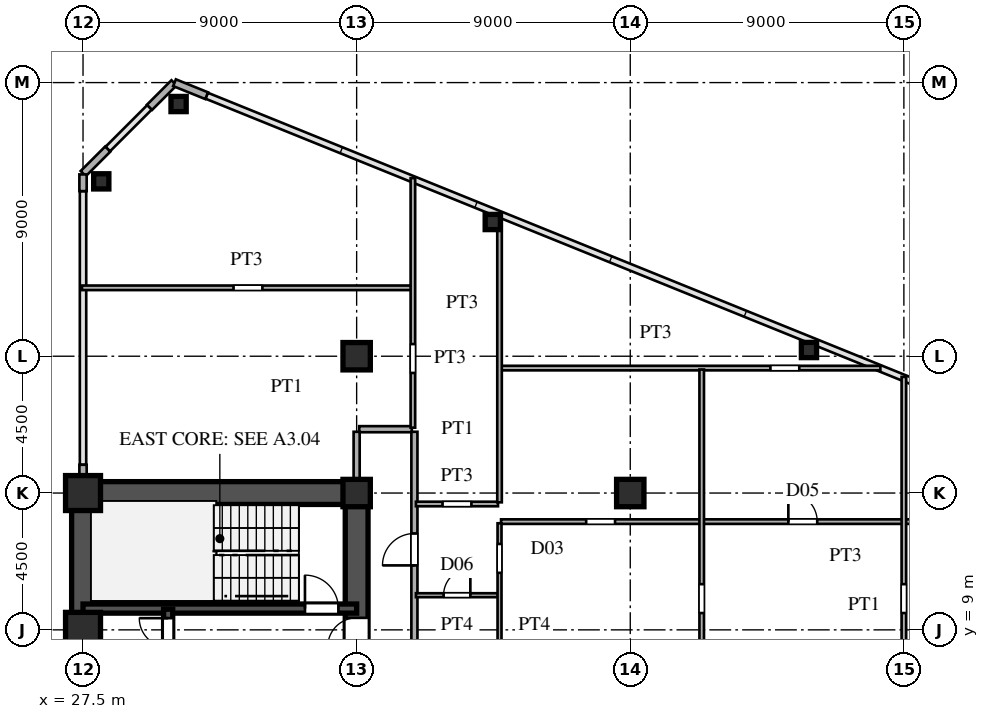
"""IFC4 building model, lengths in metres.
Left out: names, types, materials, properties, quantities, classifications, styles, units other than length and angle.
Written with IfcOpenShell. Run it as: python <this file> out.ifc"""

import sys

from ifc_helpers import new_model, si_unit, direction, frame, frame_2d, origin, origin_2d, place, context, subcontext, project, spatial, rectangle, hollow_rectangle, i_section, extrude, source, transform, mapped, element, fill, save


model = new_model("IFC4")
c1 = context("Model", 3, precision=1e-05, world=origin(), true_north=direction((0.0, 1.0)))
c2 = subcontext(c1, "Body", "Model", "MODEL_VIEW")
j1 = project(units=[si_unit("LENGTHUNIT", "METRE"), si_unit("PLANEANGLEUNIT", "RADIAN")], contexts=[c1])
p1 = place(None, origin())
s1 = spatial("IfcSite", under=j1, at=p1, CompositionType="ELEMENT")
p2 = place(p1, origin())
s2 = spatial("IfcBuilding", under=s1, at=p2, CompositionType="ELEMENT")
p3 = place(p2, frame((0.0, 0.0, 33.3)))
s3 = spatial("IfcBuildingStorey", under=s2, at=p3, CompositionType="ELEMENT", Elevation=33.3)
m1 = source(origin(), c2, "Body", "SweptSolid", [
    extrude(hollow_rectangle(XDim=1.15, YDim=1.15, WallThickness=0.048, at=origin_2d()), origin(), (0.0, 0.0, 1.0), 3.6),
])
for number, where, z_axis, x_axis in (
    (1, (27.5, 9.0, 0.0), (0.0, 0.0, 1.0), (1.0, 0.0, 0.0)),
    (2, (27.5, 13.5, 0.0), (0.0, 0.0, 1.0), (1.0, 0.0, 0.0)),
):
    element("IfcColumn", number, at=place(p3, frame(where, z_axis=z_axis, x_axis=x_axis)), inside=s3, PredefinedType="COLUMN", context=c2, shape_type="MappedRepresentation", body=[
        mapped(m1, transform((0.0, 0.0, 0.0), scale=1.0)),
    ])
m2 = source(origin(), c2, "Body", "SweptSolid", [
    extrude(i_section(OverallWidth=0.9, OverallDepth=0.9, WebThickness=0.036, FlangeThickness=0.055, at=origin_2d()), origin(), (0.0, 0.0, 1.0), 3.6),
])
for number, where, z_axis, x_axis in (
    (3, (36.5, 13.5, 0.0), (0.0, 0.0, 1.0), (1.0, 0.0, 0.0)),
    (4, (36.5, 18.0, 0.0), (0.0, 0.0, 1.0), (1.0, 0.0, 0.0)),
    (5, (45.5, 13.5, 0.0), (0.0, 0.0, 1.0), (1.0, 0.0, 0.0)),
):
    element("IfcColumn", number, at=place(p3, frame(where, z_axis=z_axis, x_axis=x_axis)), inside=s3, PredefinedType="COLUMN", context=c2, shape_type="MappedRepresentation", body=[
        mapped(m2, transform((0.0, 0.0, 0.0), scale=1.0)),
    ])
m3 = source(origin(), c2, "Body", "SweptSolid", [
    extrude(hollow_rectangle(XDim=0.5, YDim=0.5, WallThickness=0.02, at=origin_2d()), origin(), (0.0, 0.0, 1.0), 3.6),
])
for number, where, z_axis, x_axis in (
    (6, (30.643, 26.295, 0.0), (0.0, 0.0, 1.0), (1.0, 0.0, 0.0)),
    (7, (28.1, 23.751, 0.0), (0.0, 0.0, 1.0), (1.0, 0.0, 0.0)),
    (8, (40.977, 22.414, 0.0), (0.0, 0.0, 1.0), (1.0, 0.0, 0.0)),
    (9, (51.378, 18.204, 0.0), (0.0, 0.0, 1.0), (1.0, 0.0, 0.0)),
):
    element("IfcColumn", number, at=place(p3, frame(where, z_axis=z_axis, x_axis=x_axis)), inside=s3, PredefinedType="COLUMN", context=c2, shape_type="MappedRepresentation", body=[
        mapped(m3, transform((0.0, 0.0, 0.0), scale=1.0)),
    ])
p4 = place(p3, frame((31.566, 26.569, 0.0), z_axis=(0.0, 0.0, 1.0), x_axis=(-0.927007103665, 0.375043770452, 0.0)))
e10 = element("IfcWall", 10, at=p4, inside=s3, PredefinedType="SOLIDWALL", context=c2, shape_type="SweptSolid", body=[
    extrude(rectangle(XDim=1.14, YDim=0.24, at=frame_2d((0.57, 0.0))), origin(), (0.0, 0.0, 1.0), 3.38),
])
for number, where, z_axis, x_axis in (
    (11, (30.493, 26.993, 0.0), (0.0, 0.0, 1.0), (-0.707, -0.707, 0.0)),
    (12, (28.313, 24.813, 0.0), (0.0, 0.0, 1.0), (-0.707, -0.707, 0.0)),
):
    element("IfcWall", number, at=place(p3, frame(where, z_axis=z_axis, x_axis=x_axis)), inside=s3, PredefinedType="SOLIDWALL", context=c2, shape_type="SweptSolid", body=[
        extrude(rectangle(XDim=1.14, YDim=0.24, at=frame_2d((0.57, 0.0))), origin(), (0.0, 0.0, 1.0), 3.38),
    ])
p5 = place(p3, frame((27.5, 13.88, 0.0), z_axis=(0.0, 0.0, 1.0), x_axis=(0.0, 1.0, 0.0)))
e13 = element("IfcWall", 13, at=p5, inside=s3, PredefinedType="SOLIDWALL", context=c2, shape_type="SweptSolid", body=[
    extrude(rectangle(XDim=0.55, YDim=0.24, at=frame_2d((0.275, 0.0))), origin(), (0.0, 0.0, 1.0), 2.88),
])
p6 = place(p3, frame((27.5, 23.43, 0.0), z_axis=(0.0, 0.0, 1.0), x_axis=(0.0, 1.0, 0.0)))
e14 = element("IfcWall", 14, at=p6, inside=s3, PredefinedType="SOLIDWALL", context=c2, shape_type="SweptSolid", body=[
    extrude(rectangle(XDim=0.55, YDim=0.24, at=frame_2d((0.275, 0.0))), origin(), (0.0, 0.0, 1.0), 3.38),
])
p7 = place(p3, frame((27.5, 1.3, 0.0), z_axis=(0.0, 0.0, 1.0), x_axis=(0.0, 1.0, 0.0)))
e15 = element("IfcWall", 15, at=p7, inside=s3, PredefinedType="SHEAR", context=c2, shape_type="SweptSolid", body=[
    extrude(rectangle(XDim=12.2, YDim=0.75, at=frame_2d((6.1, 0.0))), origin(), (0.0, 0.0, 1.0), 3.38),
])
p8 = place(p3, frame((27.5, 13.5, 0.0), z_axis=(0.0, 0.0, 1.0), x_axis=(1.0, 0.0, 0.0)))
e16 = element("IfcWall", 16, at=p8, inside=s3, PredefinedType="SHEAR", context=c2, shape_type="SweptSolid", body=[
    extrude(rectangle(XDim=9.0, YDim=0.75, at=frame_2d((4.5, 0.0))), origin(), (0.0, 0.0, 1.0), 3.38),
])
p9 = place(p3, frame((36.5, 8.2, 0.0), z_axis=(0.0, 0.0, 1.0), x_axis=(0.0, 1.0, 0.0)))
e17 = element("IfcWall", 17, at=p9, inside=s3, PredefinedType="SHEAR", context=c2, shape_type="SweptSolid", body=[
    extrude(rectangle(XDim=5.45, YDim=0.75, at=frame_2d((2.725, 0.0))), origin(), (0.0, 0.0, 1.0), 3.38),
])
p10 = place(p9, frame((0.245, 0.0, 0.0)))
e18 = element("IfcOpeningElement", 18, at=p10, cuts=e17, PredefinedType="OPENING", context=c2, shape_type="SweptSolid", body=[
    extrude(rectangle(XDim=0.95, YDim=2.15, at=frame_2d((0.475, 1.075))), frame((0.0, 0.385, 0.0), z_axis=(0.0, -1.0, 0.0), x_axis=(1.0, 0.0, 0.0)), (0.0, 0.0, 1.0), 0.77),
])
p11 = place(p3, frame((27.5, 9.7, 0.0), z_axis=(0.0, 0.0, 1.0), x_axis=(1.0, 0.0, 0.0)))
e19 = element("IfcWall", 19, at=p11, inside=s3, PredefinedType="SHEAR", context=c2, shape_type="SweptSolid", body=[
    extrude(rectangle(XDim=9.0, YDim=0.3, at=frame_2d((4.5, 0.0))), origin(), (0.0, 0.0, 1.0), 3.38),
])
p12 = place(p11, frame((7.3, 0.0, 0.0)))
e20 = element("IfcOpeningElement", 20, at=p12, cuts=e19, PredefinedType="OPENING", context=c2, shape_type="SweptSolid", body=[
    extrude(rectangle(XDim=1.1, YDim=2.2, at=frame_2d((0.55, 1.1))), frame((0.0, 0.16, 0.0), z_axis=(0.0, -1.0, 0.0), x_axis=(1.0, 0.0, 0.0)), (0.0, 0.0, 1.0), 0.32),
])
p13 = place(p3, frame((30.3, 8.15, 0.0), z_axis=(0.0, 0.0, 1.0), x_axis=(0.0, 1.0, 0.0)))
e21 = element("IfcWall", 21, at=p13, inside=s3, PredefinedType="SHEAR", context=c2, shape_type="SweptSolid", body=[
    extrude(rectangle(XDim=1.53, YDim=0.3, at=frame_2d((0.765, 0.0))), origin(), (0.0, 0.0, 1.0), 3.38),
])
p14 = place(p13, frame((0.285, 0.0, 0.0)))
e22 = element("IfcOpeningElement", 22, at=p14, cuts=e21, PredefinedType="OPENING", context=c2, shape_type="SweptSolid", body=[
    extrude(rectangle(XDim=0.95, YDim=2.15, at=frame_2d((0.475, 1.075))), frame((0.0, 0.16, 0.0), z_axis=(0.0, -1.0, 0.0), x_axis=(1.0, 0.0, 0.0)), (0.0, 0.0, 1.0), 0.32),
])
p15 = place(p3, frame((38.45, 10.14, 0.0), z_axis=(0.0, 0.0, 1.0), x_axis=(1.0, 0.0, 0.0)))
e23 = element("IfcWall", 23, at=p15, inside=s3, PredefinedType="PARTITIONING", context=c2, shape_type="SweptSolid", body=[
    extrude(rectangle(XDim=2.7, YDim=0.13, at=frame_2d((1.35, 0.0))), origin(), (0.0, 0.0, 1.0), 3.38),
])
p16 = place(p15, frame((0.91, 0.0, 0.0)))
e24 = element("IfcOpeningElement", 24, at=p16, cuts=e23, PredefinedType="OPENING", context=c2, shape_type="SweptSolid", body=[
    extrude(rectangle(XDim=0.88, YDim=2.1, at=frame_2d((0.44, 1.05))), frame((0.0, 0.075, 0.0), z_axis=(0.0, -1.0, 0.0), x_axis=(1.0, 0.0, 0.0)), (0.0, 0.0, 1.0), 0.15),
])
p17 = place(p3, frame((41.25, 12.56, 0.0), z_axis=(0.0, 0.0, 1.0), x_axis=(1.0, 0.0, 0.0)))
e25 = element("IfcWall", 25, at=p17, inside=s3, PredefinedType="PARTITIONING", context=c2, shape_type="SweptSolid", body=[
    extrude(rectangle(XDim=24.969, YDim=0.15, at=frame_2d((12.484, 0.0))), origin(), (0.0, 0.0, 1.0), 3.38),
])
p18 = place(p17, frame((2.8, 0.0, 0.0)))
e26 = element("IfcOpeningElement", 26, at=p18, cuts=e25, PredefinedType="OPENING", context=c2, shape_type="SweptSolid", body=[
    extrude(rectangle(XDim=0.95, YDim=2.15, at=frame_2d((0.475, 1.075))), frame((0.0, 0.085, 0.0), z_axis=(0.0, -1.0, 0.0), x_axis=(1.0, 0.0, 0.0)), (0.0, 0.0, 1.0), 0.17),
])
p19 = place(p17, frame((15.625, 0.0, 0.0)))
e27 = element("IfcOpeningElement", 27, at=p19, cuts=e25, PredefinedType="OPENING", context=c2, shape_type="SweptSolid", body=[
    extrude(rectangle(XDim=0.95, YDim=2.15, at=frame_2d((0.475, 1.075))), frame((0.0, 0.085, 0.0), z_axis=(0.0, -1.0, 0.0), x_axis=(1.0, 0.0, 0.0)), (0.0, 0.0, 1.0), 0.17),
])
p20 = place(p17, frame((9.45, 0.0, 0.0)))
e28 = element("IfcOpeningElement", 28, at=p20, cuts=e25, PredefinedType="OPENING", context=c2, shape_type="SweptSolid", body=[
    extrude(rectangle(XDim=0.95, YDim=2.15, at=frame_2d((0.475, 1.075))), frame((0.0, 0.085, 0.0), z_axis=(0.0, -1.0, 0.0), x_axis=(1.0, 0.0, 0.0)), (0.0, 0.0, 1.0), 0.17),
])
p21 = place(p3, frame((38.45, 13.14, 0.0), z_axis=(0.0, 0.0, 1.0), x_axis=(1.0, 0.0, 0.0)))
e29 = element("IfcWall", 29, at=p21, inside=s3, PredefinedType="PARTITIONING", context=c2, shape_type="SweptSolid", body=[
    extrude(rectangle(XDim=2.7, YDim=0.15, at=frame_2d((1.35, 0.0))), origin(), (0.0, 0.0, 1.0), 3.38),
])
p22 = place(p21, frame((0.875, 0.0, 0.0)))
e30 = element("IfcOpeningElement", 30, at=p22, cuts=e29, PredefinedType="OPENING", context=c2, shape_type="SweptSolid", body=[
    extrude(rectangle(XDim=0.95, YDim=2.15, at=frame_2d((0.475, 1.075))), frame((0.0, 0.085, 0.0), z_axis=(0.0, -1.0, 0.0), x_axis=(1.0, 0.0, 0.0)), (0.0, 0.0, 1.0), 0.17),
])
p23 = place(p3, frame((36.585, 15.6, 0.0), z_axis=(0.0, 0.0, 1.0), x_axis=(1.0, 0.0, 0.0)))
e31 = element("IfcWall", 31, at=p23, inside=s3, PredefinedType="PARTITIONING", context=c2, shape_type="SweptSolid", body=[
    extrude(rectangle(XDim=1.73, YDim=0.2, at=frame_2d((0.865, 0.0))), origin(), (0.0, 0.0, 1.0), 3.38),
])
p24 = place(p3, frame((41.25, 17.61, 0.0), z_axis=(0.0, 0.0, 1.0), x_axis=(1.0, 0.0, 0.0)))
e32 = element("IfcWall", 32, at=p24, inside=s3, PredefinedType="PARTITIONING", context=c2, shape_type="SweptSolid", body=[
    extrude(rectangle(XDim=12.477, YDim=0.15, at=frame_2d((6.239, 0.0))), origin(), (0.0, 0.0, 1.0), 3.38),
])
p25 = place(p24, frame((8.86, 0.0, 0.0)))
e33 = element("IfcOpeningElement", 33, at=p25, cuts=e32, PredefinedType="OPENING", context=c2, shape_type="SweptSolid", body=[
    extrude(rectangle(XDim=0.95, YDim=2.15, at=frame_2d((0.475, 1.075))), frame((0.0, 0.085, 0.0), z_axis=(0.0, -1.0, 0.0), x_axis=(1.0, 0.0, 0.0)), (0.0, 0.0, 1.0), 0.17),
])
p26 = place(p3, frame((27.465, 20.25, 0.0), z_axis=(0.0, 0.0, 1.0), x_axis=(1.0, 0.0, 0.0)))
e34 = element("IfcWall", 34, at=p26, inside=s3, PredefinedType="PARTITIONING", context=c2, shape_type="SweptSolid", body=[
    extrude(rectangle(XDim=10.835, YDim=0.15, at=frame_2d((5.417, 0.0))), origin(), (0.0, 0.0, 1.0), 3.38),
])
p27 = place(p26, frame((4.985, 0.0, 0.0)))
e35 = element("IfcOpeningElement", 35, at=p27, cuts=e34, PredefinedType="OPENING", context=c2, shape_type="SweptSolid", body=[
    extrude(rectangle(XDim=0.95, YDim=2.15, at=frame_2d((0.475, 1.075))), frame((0.0, 0.085, 0.0), z_axis=(0.0, -1.0, 0.0), x_axis=(1.0, 0.0, 0.0)), (0.0, 0.0, 1.0), 0.17),
])
p28 = place(p3, frame((36.5, 13.88, 0.0), z_axis=(0.0, 0.0, 1.0), x_axis=(0.0, 1.0, 0.0)))
e36 = element("IfcWall", 36, at=p28, inside=s3, PredefinedType="PARTITIONING", context=c2, shape_type="SweptSolid", body=[
    extrude(rectangle(XDim=1.635, YDim=0.2, at=frame_2d((0.817, 0.0))), origin(), (0.0, 0.0, 1.0), 2.68),
])
p29 = place(p3, frame((38.35, 15.65, 0.0), z_axis=(0.0, 0.0, 1.0), x_axis=(0.0, 1.0, 0.0)))
e37 = element("IfcWall", 37, at=p29, inside=s3, PredefinedType="PARTITIONING", context=c2, shape_type="SweptSolid", body=[
    extrude(rectangle(XDim=8.208, YDim=0.15, at=frame_2d((4.104, 0.0))), origin(), (0.0, 0.0, 1.0), 3.38),
])
p30 = place(p29, frame((1.8, 0.0, 0.0)))
e38 = element("IfcOpeningElement", 38, at=p30, cuts=e37, PredefinedType="OPENING", context=c2, shape_type="SweptSolid", body=[
    extrude(rectangle(XDim=0.95, YDim=2.15, at=frame_2d((0.475, 1.075))), frame((0.0, 0.085, 0.0), z_axis=(0.0, -1.0, 0.0), x_axis=(1.0, 0.0, 0.0)), (0.0, 0.0, 1.0), 0.17),
])
p31 = place(p3, frame((38.4, -15.515, 0.0), z_axis=(0.0, 0.0, 1.0), x_axis=(0.0, 1.0, 0.0)))
e39 = element("IfcWall", 39, at=p31, inside=s3, PredefinedType="PARTITIONING", context=c2, shape_type="SweptSolid", body=[
    extrude(rectangle(XDim=31.03, YDim=0.2, at=frame_2d((15.515, 0.0))), origin(), (0.0, 0.0, 1.0), 3.38),
])
p32 = place(p31, frame((4.163, 0.0, 0.0)))
e40 = element("IfcOpeningElement", 40, at=p32, cuts=e39, PredefinedType="OPENING", context=c2, shape_type="SweptSolid", body=[
    extrude(rectangle(XDim=1.05, YDim=2.25, at=frame_2d((0.525, 1.125))), frame((0.0, 0.11, 0.0), z_axis=(0.0, -1.0, 0.0), x_axis=(1.0, 0.0, 0.0)), (0.0, 0.0, 1.0), 0.22),
])
p33 = place(p31, frame((15.538, 0.0, 0.0)))
e41 = element("IfcOpeningElement", 41, at=p33, cuts=e39, PredefinedType="OPENING", context=c2, shape_type="SweptSolid", body=[
    extrude(rectangle(XDim=1.05, YDim=2.25, at=frame_2d((0.525, 1.125))), frame((0.0, 0.11, 0.0), z_axis=(0.0, -1.0, 0.0), x_axis=(1.0, 0.0, 0.0)), (0.0, 0.0, 1.0), 0.22),
])
p34 = place(p31, frame((26.635, 0.0, 0.0)))
e42 = element("IfcOpeningElement", 42, at=p34, cuts=e39, PredefinedType="OPENING", context=c2, shape_type="SweptSolid", body=[
    extrude(rectangle(XDim=1.05, YDim=2.25, at=frame_2d((0.525, 1.125))), frame((0.0, 0.11, 0.0), z_axis=(0.0, -1.0, 0.0), x_axis=(1.0, 0.0, 0.0)), (0.0, 0.0, 1.0), 0.22),
])
p35 = place(p3, frame((41.2, 3.502, 0.0), z_axis=(0.0, 0.0, 1.0), x_axis=(0.0, 1.0, 0.0)))
e43 = element("IfcWall", 43, at=p35, inside=s3, PredefinedType="PARTITIONING", context=c2, shape_type="SweptSolid", body=[
    extrude(rectangle(XDim=9.004, YDim=0.13, at=frame_2d((4.502, 0.0))), origin(), (0.0, 0.0, 1.0), 3.38),
])
p36 = place(p35, frame((7.374, 0.0, 0.0)))
e44 = element("IfcOpeningElement", 44, at=p36, cuts=e43, PredefinedType="OPENING", context=c2, shape_type="SweptSolid", body=[
    extrude(rectangle(XDim=0.95, YDim=2.15, at=frame_2d((0.475, 1.075))), frame((0.0, 0.075, 0.0), z_axis=(0.0, -1.0, 0.0), x_axis=(1.0, 0.0, 0.0)), (0.0, 0.0, 1.0), 0.15),
])
p37 = place(p3, frame((41.2, 13.195, 0.0), z_axis=(0.0, 0.0, 1.0), x_axis=(0.0, 1.0, 0.0)))
e45 = element("IfcWall", 45, at=p37, inside=s3, PredefinedType="PARTITIONING", context=c2, shape_type="SweptSolid", body=[
    extrude(rectangle(XDim=9.509, YDim=0.15, at=frame_2d((4.754, 0.0))), origin(), (0.0, 0.0, 1.0), 3.38),
])
p38 = place(p3, frame((47.85, -17.063, 0.0), z_axis=(0.0, 0.0, 1.0), x_axis=(0.0, 1.0, 0.0)))
e46 = element("IfcWall", 46, at=p38, inside=s3, PredefinedType="PARTITIONING", context=c2, shape_type="SweptSolid", body=[
    extrude(rectangle(XDim=34.626, YDim=0.15, at=frame_2d((17.313, 0.0))), origin(), (0.0, 0.0, 1.0), 3.38),
])
p39 = place(p38, frame((7.81, 0.0, 0.0)))
e47 = element("IfcOpeningElement", 47, at=p39, cuts=e46, PredefinedType="OPENING", context=c2, shape_type="SweptSolid", body=[
    extrude(rectangle(XDim=0.95, YDim=2.15, at=frame_2d((0.475, 1.075))), frame((0.0, 0.085, 0.0), z_axis=(0.0, -1.0, 0.0), x_axis=(1.0, 0.0, 0.0)), (0.0, 0.0, 1.0), 0.17),
])
p40 = place(p38, frame((2.253, 0.0, 0.0)))
e48 = element("IfcOpeningElement", 48, at=p40, cuts=e46, PredefinedType="OPENING", context=c2, shape_type="SweptSolid", body=[
    extrude(rectangle(XDim=0.95, YDim=2.15, at=frame_2d((0.475, 1.075))), frame((0.0, 0.085, 0.0), z_axis=(0.0, -1.0, 0.0), x_axis=(1.0, 0.0, 0.0)), (0.0, 0.0, 1.0), 0.17),
])
p41 = place(p38, frame((17.338, 0.0, 0.0)))
e49 = element("IfcOpeningElement", 49, at=p41, cuts=e46, PredefinedType="OPENING", context=c2, shape_type="SweptSolid", body=[
    extrude(rectangle(XDim=0.95, YDim=2.15, at=frame_2d((0.475, 1.075))), frame((0.0, 0.085, 0.0), z_axis=(0.0, -1.0, 0.0), x_axis=(1.0, 0.0, 0.0)), (0.0, 0.0, 1.0), 0.17),
])
p42 = place(p38, frame((26.616, 0.0, 0.0)))
e50 = element("IfcOpeningElement", 50, at=p42, cuts=e46, PredefinedType="OPENING", context=c2, shape_type="SweptSolid", body=[
    extrude(rectangle(XDim=0.95, YDim=2.15, at=frame_2d((0.475, 1.075))), frame((0.0, 0.085, 0.0), z_axis=(0.0, -1.0, 0.0), x_axis=(1.0, 0.0, 0.0)), (0.0, 0.0, 1.0), 0.17),
])
p43 = place(p3, frame((54.5, -17.063, 0.0), z_axis=(0.0, 0.0, 1.0), x_axis=(0.0, 1.0, 0.0)))
e51 = element("IfcWall", 51, at=p43, inside=s3, PredefinedType="PARTITIONING", context=c2, shape_type="SweptSolid", body=[
    extrude(rectangle(XDim=34.384, YDim=0.15, at=frame_2d((17.192, 0.0))), origin(), (0.0, 0.0, 1.0), 2.68),
])
p44 = place(p43, frame((7.81, 0.0, 0.0)))
e52 = element("IfcOpeningElement", 52, at=p44, cuts=e51, PredefinedType="OPENING", context=c2, shape_type="SweptSolid", body=[
    extrude(rectangle(XDim=0.95, YDim=2.15, at=frame_2d((0.475, 1.075))), frame((0.0, 0.085, 0.0), z_axis=(0.0, -1.0, 0.0), x_axis=(1.0, 0.0, 0.0)), (0.0, 0.0, 1.0), 0.17),
])
p45 = place(p43, frame((17.338, 0.0, 0.0)))
e53 = element("IfcOpeningElement", 53, at=p45, cuts=e51, PredefinedType="OPENING", context=c2, shape_type="SweptSolid", body=[
    extrude(rectangle(XDim=0.95, YDim=2.15, at=frame_2d((0.475, 1.075))), frame((0.0, 0.085, 0.0), z_axis=(0.0, -1.0, 0.0), x_axis=(1.0, 0.0, 0.0)), (0.0, 0.0, 1.0), 0.17),
])
p46 = place(p43, frame((13.131, 0.0, 0.0)))
e54 = element("IfcOpeningElement", 54, at=p46, cuts=e51, PredefinedType="OPENING", context=c2, shape_type="SweptSolid", body=[
    extrude(rectangle(XDim=0.95, YDim=2.15, at=frame_2d((0.475, 1.075))), frame((0.0, 0.085, 0.0), z_axis=(0.0, -1.0, 0.0), x_axis=(1.0, 0.0, 0.0)), (0.0, 0.0, 1.0), 0.17),
])
p47 = place(p43, frame((22.131, 0.0, 0.0)))
e55 = element("IfcOpeningElement", 55, at=p47, cuts=e51, PredefinedType="OPENING", context=c2, shape_type="SweptSolid", body=[
    extrude(rectangle(XDim=0.95, YDim=2.15, at=frame_2d((0.475, 1.075))), frame((0.0, 0.085, 0.0), z_axis=(0.0, -1.0, 0.0), x_axis=(1.0, 0.0, 0.0)), (0.0, 0.0, 1.0), 0.17),
])
p48 = place(p43, frame((26.616, 0.0, 0.0)))
e56 = element("IfcOpeningElement", 56, at=p48, cuts=e51, PredefinedType="OPENING", context=c2, shape_type="SweptSolid", body=[
    extrude(rectangle(XDim=0.95, YDim=2.15, at=frame_2d((0.475, 1.075))), frame((0.0, 0.085, 0.0), z_axis=(0.0, -1.0, 0.0), x_axis=(1.0, 0.0, 0.0)), (0.0, 0.0, 1.0), 0.17),
])
m4 = source(origin(), c2, "Body", "SweptSolid", [
    extrude(rectangle(XDim=0.95, YDim=2.15, at=frame_2d((0.475, 1.075))), frame((0.0, 0.025, 0.0), z_axis=(0.0, -1.0, 0.0), x_axis=(1.0, 0.0, 0.0)), (0.0, 0.0, 1.0), 0.05),
])
p49 = place(p10, origin())
e57 = element("IfcDoor", 57, at=p49, inside=s3, OperationType="SINGLE_SWING_LEFT", PredefinedType="DOOR", context=c2, shape_type="MappedRepresentation", body=[
    mapped(m4, transform((0.0, 0.0, 0.0), scale=1.0)),
])
fill(e18, e57)
m5 = source(origin(), c2, "Body", "SweptSolid", [
    extrude(rectangle(XDim=1.1, YDim=2.2, at=frame_2d((0.55, 1.1))), frame((0.0, 0.025, 0.0), z_axis=(0.0, -1.0, 0.0), x_axis=(1.0, 0.0, 0.0)), (0.0, 0.0, 1.0), 0.05),
])
p50 = place(p12, origin())
e58 = element("IfcDoor", 58, at=p50, inside=s3, OperationType="SINGLE_SWING_LEFT", PredefinedType="DOOR", context=c2, shape_type="MappedRepresentation", body=[
    mapped(m5, transform((0.0, 0.0, 0.0), scale=1.0)),
])
fill(e20, e58)
p51 = place(p14, origin())
e59 = element("IfcDoor", 59, at=p51, inside=s3, OperationType="SINGLE_SWING_RIGHT", PredefinedType="DOOR", context=c2, shape_type="MappedRepresentation", body=[
    mapped(m4, transform((0.0, 0.0, 0.0), scale=1.0)),
])
fill(e22, e59)
m6 = source(origin(), c2, "Body", "SweptSolid", [
    extrude(rectangle(XDim=0.88, YDim=2.1, at=frame_2d((0.44, 1.05))), frame((0.0, 0.025, 0.0), z_axis=(0.0, -1.0, 0.0), x_axis=(1.0, 0.0, 0.0)), (0.0, 0.0, 1.0), 0.05),
])
p52 = place(p16, origin())
e60 = element("IfcDoor", 60, at=p52, inside=s3, OperationType="SINGLE_SWING_RIGHT", PredefinedType="DOOR", context=c2, shape_type="MappedRepresentation", body=[
    mapped(m6, transform((0.0, 0.0, 0.0), scale=1.0)),
])
fill(e24, e60)
m7 = source(origin(), c2, "Body", "SweptSolid", [
    extrude(rectangle(XDim=0.95, YDim=2.15, at=frame_2d((0.475, 1.075))), frame((0.0, 0.025, 0.0), z_axis=(0.0, -1.0, 0.0), x_axis=(1.0, 0.0, 0.0)), (0.0, 0.0, 1.0), 0.05),
])
p53 = place(p20, origin())
e61 = element("IfcDoor", 61, at=p53, inside=s3, OperationType="SINGLE_SWING_LEFT", PredefinedType="DOOR", context=c2, shape_type="MappedRepresentation", body=[
    mapped(m7, transform((0.0, 0.0, 0.0), scale=1.0)),
])
fill(e28, e61)
m8 = source(origin(), c2, "Body", "SweptSolid", [
    extrude(rectangle(XDim=1.05, YDim=2.25, at=frame_2d((0.525, 1.125))), frame((0.0, 0.025, 0.0), z_axis=(0.0, -1.0, 0.0), x_axis=(1.0, 0.0, 0.0)), (0.0, 0.0, 1.0), 0.05),
])
p54 = place(p34, origin())
e62 = element("IfcDoor", 62, at=p54, inside=s3, OperationType="SINGLE_SWING_LEFT", PredefinedType="DOOR", context=c2, shape_type="MappedRepresentation", body=[
    mapped(m8, transform((0.0, 0.0, 0.0), scale=1.0)),
])
fill(e42, e62)
save(model, sys.argv[1])
